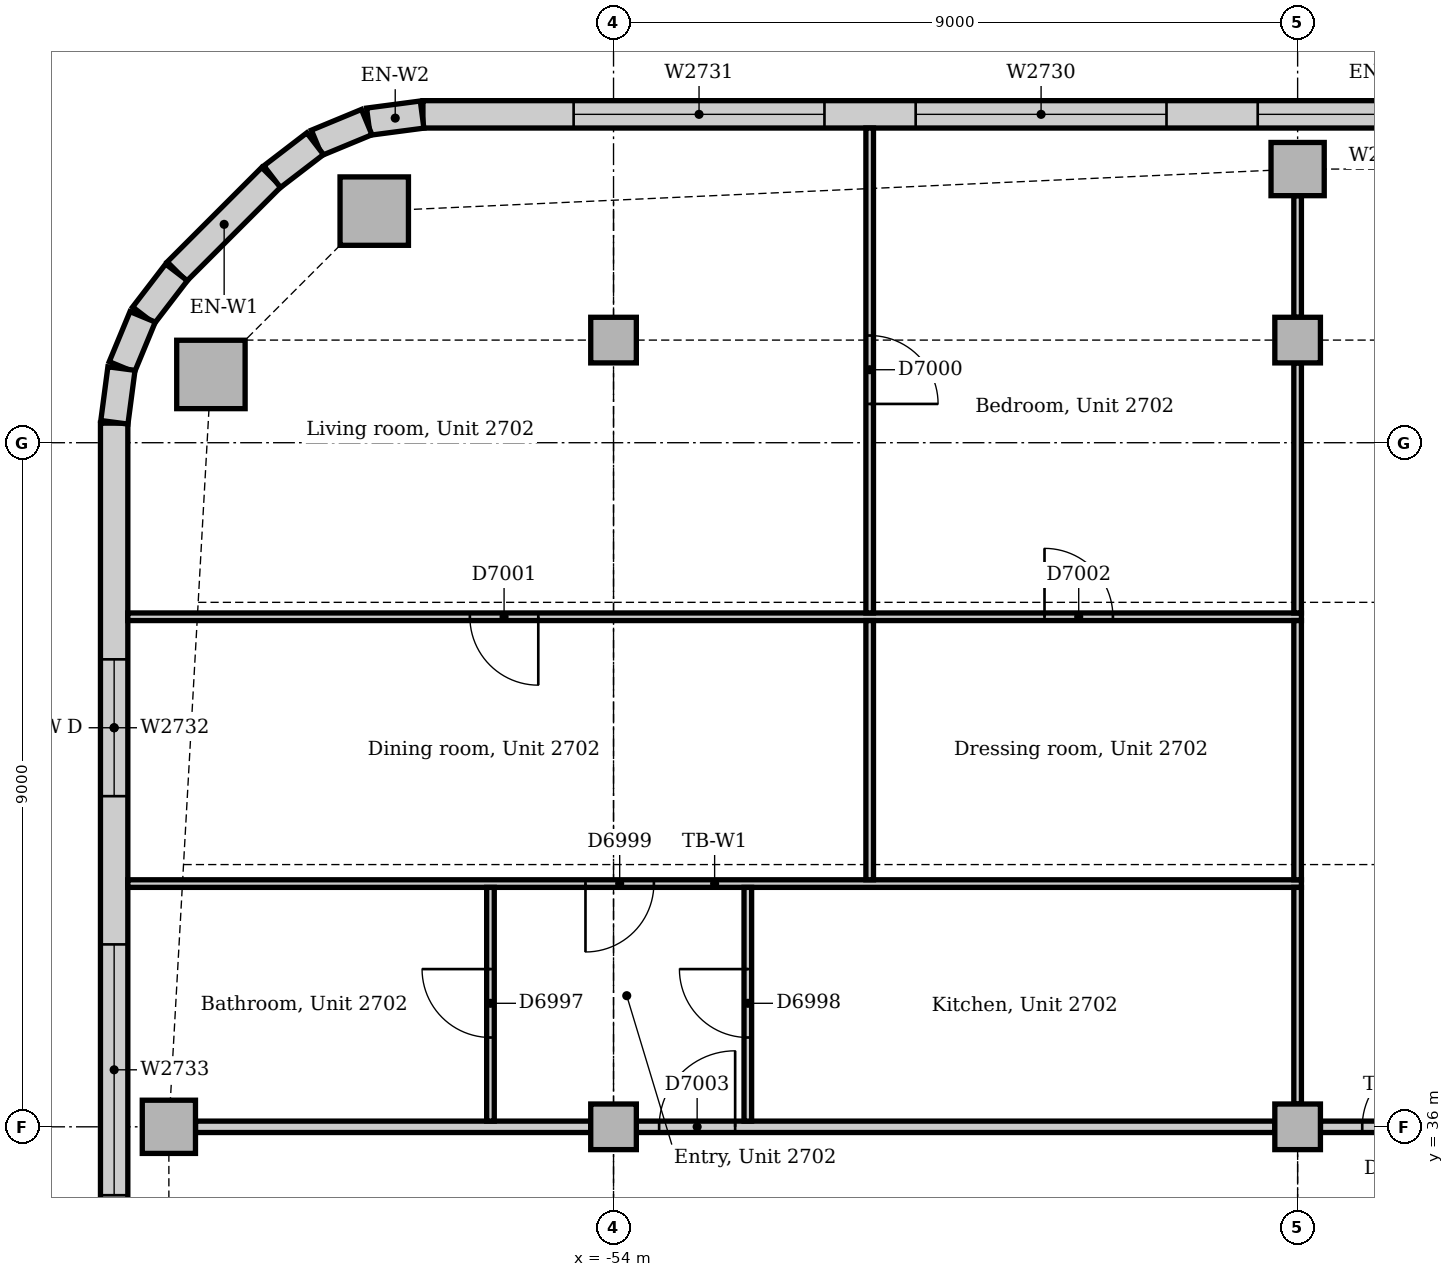
"""IFC4 building model, lengths in metres.
Left out: names, types, materials, properties, quantities, classifications, styles, units other than length and angle.
Written with IfcOpenShell. Run it as: python <this file> out.ifc"""

import sys

from ifc_helpers import new_model, si_unit, direction, frame, frame_2d, origin, origin_2d, place, context, subcontext, project, spatial, rectangle, extrude, element, fill, save


model = new_model("IFC4")
c1 = context("Model", 3, precision=1e-05, world=origin(), true_north=direction((0.0, 1.0)))
c2 = subcontext(c1, "Body", "Model", "MODEL_VIEW")
j1 = project(units=[si_unit("LENGTHUNIT", "METRE"), si_unit("PLANEANGLEUNIT", "RADIAN")], contexts=[c1])
p1 = place(None, origin())
s1 = spatial("IfcSite", under=j1, at=p1, CompositionType="ELEMENT")
p2 = place(p1, origin())
s2 = spatial("IfcBuilding", under=s1, at=p2, CompositionType="ELEMENT")
p3 = place(p2, frame((0.0, 0.0, 116.0)))
s3 = spatial("IfcBuildingStorey", under=s2, at=p3, CompositionType="ELEMENT", Elevation=116.0)
for number, where, z_axis, x_axis in (
    (1, (-57.148, 48.047, 0.0), (0.0, 0.0, 1.0), (1.0, 0.0, 0.0)),
    (2, (-59.297, 45.898, 0.0), (0.0, 0.0, 1.0), (1.0, 0.0, 0.0)),
):
    element("IfcColumn", number, at=place(p3, frame(where, z_axis=z_axis, x_axis=x_axis)), inside=s3, PredefinedType="COLUMN", context=c2, shape_type="SweptSolid", body=[
        extrude(rectangle(XDim=0.9, YDim=0.9, at=origin_2d()), origin(), (0.0, 0.0, 1.0), 3.85),
    ])
for number, where, z_axis, x_axis in (
    (3, (-45.0, 48.6, 0.0), (0.0, 0.0, 1.0), (1.0, 0.0, 0.0)),
    (4, (-59.85, 36.0, 0.0), (0.0, 0.0, 1.0), (1.0, 0.0, 0.0)),
):
    element("IfcColumn", number, at=place(p3, frame(where, z_axis=z_axis, x_axis=x_axis)), inside=s3, PredefinedType="COLUMN", context=c2, shape_type="SweptSolid", body=[
        extrude(rectangle(XDim=0.7, YDim=0.7, at=origin_2d()), origin(), (0.0, 0.0, 1.0), 3.85),
    ])
for number, where, z_axis, x_axis in (
    (5, (-54.0, 36.0, 0.0), (0.0, 0.0, 1.0), (1.0, 0.0, 0.0)),
    (6, (-54.0, 46.35, 0.0), (0.0, 0.0, 1.0), (1.0, 0.0, 0.0)),
    (7, (-45.0, 36.0, 0.0), (0.0, 0.0, 1.0), (1.0, 0.0, 0.0)),
    (8, (-45.0, 46.35, 0.0), (0.0, 0.0, 1.0), (1.0, 0.0, 0.0)),
):
    element("IfcColumn", number, at=place(p3, frame(where, z_axis=z_axis, x_axis=x_axis)), inside=s3, PredefinedType="COLUMN", context=c2, shape_type="SweptSolid", body=[
        extrude(rectangle(XDim=0.6, YDim=0.6, at=origin_2d()), origin(), (0.0, 0.0, 1.0), 3.85),
    ])
p4 = place(p3, frame((-31.243, 49.32, 0.0), z_axis=(0.0, 0.0, 1.0), x_axis=(-1.0, 0.0, 0.0)))
e9 = element("IfcWall", 9, at=p4, inside=s3, PredefinedType="STANDARD", context=c2, shape_type="SweptSolid", body=[
    extrude(rectangle(XDim=25.265, YDim=0.36, at=frame_2d((12.632, 0.0))), origin(), (0.0, 0.0, 1.0), 3.85),
])
p5 = place(p4, frame((1.982, 0.0, 0.9)))
e10 = element("IfcOpeningElement", 10, at=p5, cuts=e9, PredefinedType="OPENING", context=c2, shape_type="SweptSolid", body=[
    extrude(rectangle(XDim=3.3, YDim=1.6, at=frame_2d((1.65, 0.8))), frame((0.0, 0.19, 0.0), z_axis=(0.0, -1.0, 0.0), x_axis=(1.0, 0.0, 0.0)), (0.0, 0.0, 1.0), 0.38),
])
p6 = place(p4, frame((6.482, 0.0, 0.9)))
e11 = element("IfcOpeningElement", 11, at=p6, cuts=e9, PredefinedType="OPENING", context=c2, shape_type="SweptSolid", body=[
    extrude(rectangle(XDim=3.3, YDim=1.6, at=frame_2d((1.65, 0.8))), frame((0.0, 0.19, 0.0), z_axis=(0.0, -1.0, 0.0), x_axis=(1.0, 0.0, 0.0)), (0.0, 0.0, 1.0), 0.38),
])
p7 = place(p4, frame((10.982, 0.0, 0.9)))
e12 = element("IfcOpeningElement", 12, at=p7, cuts=e9, PredefinedType="OPENING", context=c2, shape_type="SweptSolid", body=[
    extrude(rectangle(XDim=3.3, YDim=1.6, at=frame_2d((1.65, 0.8))), frame((0.0, 0.19, 0.0), z_axis=(0.0, -1.0, 0.0), x_axis=(1.0, 0.0, 0.0)), (0.0, 0.0, 1.0), 0.38),
])
p8 = place(p4, frame((15.482, 0.0, 0.9)))
e13 = element("IfcOpeningElement", 13, at=p8, cuts=e9, PredefinedType="OPENING", context=c2, shape_type="SweptSolid", body=[
    extrude(rectangle(XDim=3.3, YDim=1.6, at=frame_2d((1.65, 0.8))), frame((0.0, 0.19, 0.0), z_axis=(0.0, -1.0, 0.0), x_axis=(1.0, 0.0, 0.0)), (0.0, 0.0, 1.0), 0.38),
])
p9 = place(p4, frame((19.982, 0.0, 0.9)))
e14 = element("IfcOpeningElement", 14, at=p9, cuts=e9, PredefinedType="OPENING", context=c2, shape_type="SweptSolid", body=[
    extrude(rectangle(XDim=3.3, YDim=1.6, at=frame_2d((1.65, 0.8))), frame((0.0, 0.19, 0.0), z_axis=(0.0, -1.0, 0.0), x_axis=(1.0, 0.0, 0.0)), (0.0, 0.0, 1.0), 0.38),
])
p10 = place(p3, frame((-58.501, 48.494, 0.0), z_axis=(0.0, 0.0, 1.0), x_axis=(-0.707106781187, -0.707106781187, 0.0)))
e15 = element("IfcWall", 15, at=p10, inside=s3, PredefinedType="STANDARD", context=c2, shape_type="SweptSolid", body=[
    extrude(rectangle(XDim=1.757, YDim=0.36, at=frame_2d((0.879, 0.0))), origin(), (0.0, 0.0, 1.0), 3.85),
])
p11 = place(p3, frame((-60.57, 45.257, 0.0), z_axis=(0.0, 0.0, 1.0), x_axis=(0.0, -1.0, 0.0)))
e16 = element("IfcWall", 16, at=p11, inside=s3, PredefinedType="STANDARD", context=c2, shape_type="SweptSolid", body=[
    extrude(rectangle(XDim=21.515, YDim=0.36, at=frame_2d((10.757, 0.0))), origin(), (0.0, 0.0, 1.0), 3.85),
])
p12 = place(p11, frame((3.107, 0.0, 0.9)))
e17 = element("IfcOpeningElement", 17, at=p12, cuts=e16, PredefinedType="OPENING", context=c2, shape_type="SweptSolid", body=[
    extrude(rectangle(XDim=1.8, YDim=1.6, at=frame_2d((0.9, 0.8))), frame((0.0, 0.19, 0.0), z_axis=(0.0, -1.0, 0.0), x_axis=(1.0, 0.0, 0.0)), (0.0, 0.0, 1.0), 0.38),
])
p13 = place(p11, frame((6.857, 0.0, 0.9)))
e18 = element("IfcOpeningElement", 18, at=p13, cuts=e16, PredefinedType="OPENING", context=c2, shape_type="SweptSolid", body=[
    extrude(rectangle(XDim=3.3, YDim=1.6, at=frame_2d((1.65, 0.8))), frame((0.0, 0.19, 0.0), z_axis=(0.0, -1.0, 0.0), x_axis=(1.0, 0.0, 0.0)), (0.0, 0.0, 1.0), 0.38),
])
p14 = place(p11, frame((11.357, 0.0, 0.9)))
e19 = element("IfcOpeningElement", 19, at=p14, cuts=e16, PredefinedType="OPENING", context=c2, shape_type="SweptSolid", body=[
    extrude(rectangle(XDim=3.3, YDim=1.6, at=frame_2d((1.65, 0.8))), frame((0.0, 0.19, 0.0), z_axis=(0.0, -1.0, 0.0), x_axis=(1.0, 0.0, 0.0)), (0.0, 0.0, 1.0), 0.38),
])
p15 = place(p11, frame((15.857, 0.0, 0.9)))
e20 = element("IfcOpeningElement", 20, at=p15, cuts=e16, PredefinedType="OPENING", context=c2, shape_type="SweptSolid", body=[
    extrude(rectangle(XDim=3.3, YDim=1.6, at=frame_2d((1.65, 0.8))), frame((0.0, 0.19, 0.0), z_axis=(0.0, -1.0, 0.0), x_axis=(1.0, 0.0, 0.0)), (0.0, 0.0, 1.0), 0.38),
])
for number, where, z_axis, x_axis in (
    (21, (-56.519, 49.317, 0.0), (0.0, 0.0, 1.0), (-0.991, -0.131, 0.0)),
    (22, (-57.247, 49.218, 0.0), (0.0, 0.0, 1.0), (-0.924, -0.383, 0.0)),
):
    element("IfcWall", number, at=place(p3, frame(where, z_axis=z_axis, x_axis=x_axis)), inside=s3, PredefinedType="STANDARD", context=c2, shape_type="SweptSolid", body=[
        extrude(rectangle(XDim=0.713, YDim=0.36, at=frame_2d((0.356, 0.0))), origin(), (0.0, 0.0, 1.0), 3.85),
    ])
for number, where, z_axis, x_axis in (
    (23, (-57.925, 48.934, 0.0), (0.0, 0.0, 1.0), (-0.793, -0.609, 0.0)),
    (24, (-59.75, 47.241, 0.0), (0.0, 0.0, 1.0), (-0.609, -0.793, 0.0)),
):
    element("IfcWall", number, at=place(p3, frame(where, z_axis=z_axis, x_axis=x_axis)), inside=s3, PredefinedType="STANDARD", context=c2, shape_type="SweptSolid", body=[
        extrude(rectangle(XDim=0.713, YDim=0.36, at=frame_2d((0.357, 0.0))), origin(), (0.0, 0.0, 1.0), 3.85),
    ])
for number, where, z_axis, x_axis in (
    (25, (-60.195, 46.656, 0.0), (0.0, 0.0, 1.0), (-0.383, -0.924, 0.0)),
    (26, (-60.474, 45.976, 0.0), (0.0, 0.0, 1.0), (-0.131, -0.991, 0.0)),
):
    element("IfcWall", number, at=place(p3, frame(where, z_axis=z_axis, x_axis=x_axis)), inside=s3, PredefinedType="STANDARD", context=c2, shape_type="SweptSolid", body=[
        extrude(rectangle(XDim=0.713, YDim=0.36, at=frame_2d((0.356, 0.0))), origin(), (0.0, 0.0, 1.0), 3.85),
    ])
p16 = place(p3, frame((-44.7, 36.0, 0.0), z_axis=(0.0, 0.0, 1.0), x_axis=(1.0, 0.0, 0.0)))
e27 = element("IfcWall", 27, at=p16, inside=s3, PredefinedType="PARTITIONING", context=c2, shape_type="SweptSolid", body=[
    extrude(rectangle(XDim=1.975, YDim=0.15, at=frame_2d((0.988, 0.0))), origin(), (0.0, 0.0, 1.0), 3.602),
])
p17 = place(p16, frame((0.55, 0.0, 0.0)))
e28 = element("IfcOpeningElement", 28, at=p17, cuts=e27, PredefinedType="OPENING", context=c2, shape_type="SweptSolid", body=[
    extrude(rectangle(XDim=0.9, YDim=2.1, at=frame_2d((0.45, 1.05))), frame((0.0, 0.085, 0.0), z_axis=(0.0, -1.0, 0.0), x_axis=(1.0, 0.0, 0.0)), (0.0, 0.0, 1.0), 0.17),
])
p18 = place(p3, frame((-53.7, 36.0, 0.0), z_axis=(0.0, 0.0, 1.0), x_axis=(1.0, 0.0, 0.0)))
e29 = element("IfcWall", 29, at=p18, inside=s3, PredefinedType="PARTITIONING", context=c2, shape_type="SweptSolid", body=[
    extrude(rectangle(XDim=8.4, YDim=0.15, at=frame_2d((4.2, 0.0))), origin(), (0.0, 0.0, 1.0), 3.262),
])
p19 = place(p18, frame((0.3, 0.0, 0.0)))
e30 = element("IfcOpeningElement", 30, at=p19, cuts=e29, PredefinedType="OPENING", context=c2, shape_type="SweptSolid", body=[
    extrude(rectangle(XDim=1.0, YDim=2.1, at=frame_2d((0.5, 1.05))), frame((0.0, 0.085, 0.0), z_axis=(0.0, -1.0, 0.0), x_axis=(1.0, 0.0, 0.0)), (0.0, 0.0, 1.0), 0.17),
])
p20 = place(p3, frame((-59.5, 36.0, 0.0), z_axis=(0.0, 0.0, 1.0), x_axis=(1.0, 0.0, 0.0)))
e31 = element("IfcWall", 31, at=p20, inside=s3, PredefinedType="PARTITIONING", context=c2, shape_type="SweptSolid", body=[
    extrude(rectangle(XDim=5.2, YDim=0.15, at=frame_2d((2.6, 0.0))), origin(), (0.0, 0.0, 1.0), 3.35),
])
p21 = place(p3, frame((-60.39, 39.2, 0.0), z_axis=(0.0, 0.0, 1.0), x_axis=(1.0, 0.0, 0.0)))
e32 = element("IfcWall", 32, at=p21, inside=s3, PredefinedType="PARTITIONING", context=c2, shape_type="SweptSolid", body=[
    extrude(rectangle(XDim=15.44, YDim=0.1, at=frame_2d((7.72, 0.0))), origin(), (0.0, 0.0, 1.0), 3.85),
])
p22 = place(p21, frame((6.021, 0.0, 0.0)))
e33 = element("IfcOpeningElement", 33, at=p22, cuts=e32, PredefinedType="OPENING", context=c2, shape_type="SweptSolid", body=[
    extrude(rectangle(XDim=0.9, YDim=2.1, at=frame_2d((0.45, 1.05))), frame((0.0, 0.06, 0.0), z_axis=(0.0, -1.0, 0.0), x_axis=(1.0, 0.0, 0.0)), (0.0, 0.0, 1.0), 0.12),
])
p23 = place(p3, frame((-60.39, 42.71, 0.0), z_axis=(0.0, 0.0, 1.0), x_axis=(1.0, 0.0, 0.0)))
e34 = element("IfcWall", 34, at=p23, inside=s3, PredefinedType="PARTITIONING", context=c2, shape_type="SweptSolid", body=[
    extrude(rectangle(XDim=15.44, YDim=0.1, at=frame_2d((7.72, 0.0))), origin(), (0.0, 0.0, 1.0), 3.85),
])
p24 = place(p23, frame((4.5, 0.0, 0.0)))
e35 = element("IfcOpeningElement", 35, at=p24, cuts=e34, PredefinedType="OPENING", context=c2, shape_type="SweptSolid", body=[
    extrude(rectangle(XDim=0.9, YDim=2.1, at=frame_2d((0.45, 1.05))), frame((0.0, 0.06, 0.0), z_axis=(0.0, -1.0, 0.0), x_axis=(1.0, 0.0, 0.0)), (0.0, 0.0, 1.0), 0.12),
])
p25 = place(p23, frame((12.06, 0.0, 0.0)))
e36 = element("IfcOpeningElement", 36, at=p25, cuts=e34, PredefinedType="OPENING", context=c2, shape_type="SweptSolid", body=[
    extrude(rectangle(XDim=0.9, YDim=2.1, at=frame_2d((0.45, 1.05))), frame((0.0, 0.06, 0.0), z_axis=(0.0, -1.0, 0.0), x_axis=(1.0, 0.0, 0.0)), (0.0, 0.0, 1.0), 0.12),
])
p26 = place(p3, frame((-45.0, 42.76, 0.0), z_axis=(0.0, 0.0, 1.0), x_axis=(0.0, 1.0, 0.0)))
e37 = element("IfcWall", 37, at=p26, inside=s3, PredefinedType="PARTITIONING", context=c2, shape_type="SweptSolid", body=[
    extrude(rectangle(XDim=3.29, YDim=0.1, at=frame_2d((1.645, 0.0))), origin(), (0.0, 0.0, 1.0), 3.362),
])
p27 = place(p3, frame((-45.0, 39.25, 0.0), z_axis=(0.0, 0.0, 1.0), x_axis=(0.0, 1.0, 0.0)))
e38 = element("IfcWall", 38, at=p27, inside=s3, PredefinedType="PARTITIONING", context=c2, shape_type="SweptSolid", body=[
    extrude(rectangle(XDim=3.41, YDim=0.1, at=frame_2d((1.705, 0.0))), origin(), (0.0, 0.0, 1.0), 3.362),
])
p28 = place(p3, frame((-45.0, 36.3, 0.0), z_axis=(0.0, 0.0, 1.0), x_axis=(0.0, 1.0, 0.0)))
e39 = element("IfcWall", 39, at=p28, inside=s3, PredefinedType="PARTITIONING", context=c2, shape_type="SweptSolid", body=[
    extrude(rectangle(XDim=2.85, YDim=0.1, at=frame_2d((1.425, 0.0))), origin(), (0.0, 0.0, 1.0), 3.362),
])
p29 = place(p3, frame((-45.0, 46.65, 0.0), z_axis=(0.0, 0.0, 1.0), x_axis=(0.0, 1.0, 0.0)))
e40 = element("IfcWall", 40, at=p29, inside=s3, PredefinedType="PARTITIONING", context=c2, shape_type="SweptSolid", body=[
    extrude(rectangle(XDim=1.6, YDim=0.1, at=frame_2d((0.8, 0.0))), origin(), (0.0, 0.0, 1.0), 3.652),
])
p30 = place(p3, frame((-50.63, 39.25, 0.0), z_axis=(0.0, 0.0, 1.0), x_axis=(0.0, 1.0, 0.0)))
e41 = element("IfcWall", 41, at=p30, inside=s3, PredefinedType="PARTITIONING", context=c2, shape_type="SweptSolid", body=[
    extrude(rectangle(XDim=3.41, YDim=0.1, at=frame_2d((1.705, 0.0))), origin(), (0.0, 0.0, 1.0), 3.85),
])
p31 = place(p3, frame((-50.63, 42.76, 0.0), z_axis=(0.0, 0.0, 1.0), x_axis=(0.0, 1.0, 0.0)))
e42 = element("IfcWall", 42, at=p31, inside=s3, PredefinedType="PARTITIONING", context=c2, shape_type="SweptSolid", body=[
    extrude(rectangle(XDim=6.38, YDim=0.1, at=frame_2d((3.19, 0.0))), origin(), (0.0, 0.0, 1.0), 3.85),
])
p32 = place(p31, frame((2.75, 0.0, 0.0)))
e43 = element("IfcOpeningElement", 43, at=p32, cuts=e42, PredefinedType="OPENING", context=c2, shape_type="SweptSolid", body=[
    extrude(rectangle(XDim=0.9, YDim=2.1, at=frame_2d((0.45, 1.05))), frame((0.0, 0.06, 0.0), z_axis=(0.0, -1.0, 0.0), x_axis=(1.0, 0.0, 0.0)), (0.0, 0.0, 1.0), 0.12),
])
p33 = place(p3, frame((-55.619, 36.075, 0.0), z_axis=(0.0, 0.0, 1.0), x_axis=(0.0, 1.0, 0.0)))
e44 = element("IfcWall", 44, at=p33, inside=s3, PredefinedType="PARTITIONING", context=c2, shape_type="SweptSolid", body=[
    extrude(rectangle(XDim=3.075, YDim=0.1, at=frame_2d((1.538, 0.0))), origin(), (0.0, 0.0, 1.0), 3.85),
])
p34 = place(p33, frame((1.1, 0.0, 0.0)))
e45 = element("IfcOpeningElement", 45, at=p34, cuts=e44, PredefinedType="OPENING", context=c2, shape_type="SweptSolid", body=[
    extrude(rectangle(XDim=0.9, YDim=2.1, at=frame_2d((0.45, 1.05))), frame((0.0, 0.06, 0.0), z_axis=(0.0, -1.0, 0.0), x_axis=(1.0, 0.0, 0.0)), (0.0, 0.0, 1.0), 0.12),
])
p35 = place(p3, frame((-52.233, 36.075, 0.0), z_axis=(0.0, 0.0, 1.0), x_axis=(0.0, 1.0, 0.0)))
e46 = element("IfcWall", 46, at=p35, inside=s3, PredefinedType="PARTITIONING", context=c2, shape_type="SweptSolid", body=[
    extrude(rectangle(XDim=3.075, YDim=0.1, at=frame_2d((1.538, 0.0))), origin(), (0.0, 0.0, 1.0), 3.85),
])
p36 = place(p35, frame((1.1, 0.0, 0.0)))
e47 = element("IfcOpeningElement", 47, at=p36, cuts=e46, PredefinedType="OPENING", context=c2, shape_type="SweptSolid", body=[
    extrude(rectangle(XDim=0.9, YDim=2.1, at=frame_2d((0.45, 1.05))), frame((0.0, 0.06, 0.0), z_axis=(0.0, -1.0, 0.0), x_axis=(1.0, 0.0, 0.0)), (0.0, 0.0, 1.0), 0.12),
])
p37 = place(p7, origin())
e48 = element("IfcWindow", 48, at=p37, inside=s3, PartitioningType="SINGLE_PANEL", PredefinedType="WINDOW", context=c2, shape_type="SweptSolid", body=[
    extrude(rectangle(XDim=3.3, YDim=1.6, at=frame_2d((1.65, 0.8))), frame((0.0, 0.13, 0.0), z_axis=(0.0, -1.0, 0.0), x_axis=(1.0, 0.0, 0.0)), (0.0, 0.0, 1.0), 0.06),
])
fill(e12, e48)
p38 = place(p8, origin())
e49 = element("IfcWindow", 49, at=p38, inside=s3, PartitioningType="SINGLE_PANEL", PredefinedType="WINDOW", context=c2, shape_type="SweptSolid", body=[
    extrude(rectangle(XDim=3.3, YDim=1.6, at=frame_2d((1.65, 0.8))), frame((0.0, 0.13, 0.0), z_axis=(0.0, -1.0, 0.0), x_axis=(1.0, 0.0, 0.0)), (0.0, 0.0, 1.0), 0.06),
])
fill(e13, e49)
p39 = place(p9, origin())
e50 = element("IfcWindow", 50, at=p39, inside=s3, PartitioningType="SINGLE_PANEL", PredefinedType="WINDOW", context=c2, shape_type="SweptSolid", body=[
    extrude(rectangle(XDim=3.3, YDim=1.6, at=frame_2d((1.65, 0.8))), frame((0.0, 0.13, 0.0), z_axis=(0.0, -1.0, 0.0), x_axis=(1.0, 0.0, 0.0)), (0.0, 0.0, 1.0), 0.06),
])
fill(e14, e50)
p40 = place(p12, origin())
e51 = element("IfcWindow", 51, at=p40, inside=s3, PartitioningType="SINGLE_PANEL", PredefinedType="WINDOW", context=c2, shape_type="SweptSolid", body=[
    extrude(rectangle(XDim=1.8, YDim=1.6, at=frame_2d((0.9, 0.8))), frame((0.0, 0.13, 0.0), z_axis=(0.0, -1.0, 0.0), x_axis=(1.0, 0.0, 0.0)), (0.0, 0.0, 1.0), 0.06),
])
fill(e17, e51)
p41 = place(p13, origin())
e52 = element("IfcWindow", 52, at=p41, inside=s3, PartitioningType="SINGLE_PANEL", PredefinedType="WINDOW", context=c2, shape_type="SweptSolid", body=[
    extrude(rectangle(XDim=3.3, YDim=1.6, at=frame_2d((1.65, 0.8))), frame((0.0, 0.13, 0.0), z_axis=(0.0, -1.0, 0.0), x_axis=(1.0, 0.0, 0.0)), (0.0, 0.0, 1.0), 0.06),
])
fill(e18, e52)
p42 = place(p17, origin())
e53 = element("IfcDoor", 53, at=p42, inside=s3, OperationType="SINGLE_SWING_RIGHT", PredefinedType="DOOR", context=c2, shape_type="SweptSolid", body=[
    extrude(rectangle(XDim=0.9, YDim=2.1, at=frame_2d((0.45, 1.05))), frame((0.0, 0.025, 0.0), z_axis=(0.0, -1.0, 0.0), x_axis=(1.0, 0.0, 0.0)), (0.0, 0.0, 1.0), 0.05),
])
fill(e28, e53)
p43 = place(p34, origin())
e54 = element("IfcDoor", 54, at=p43, inside=s3, OperationType="SINGLE_SWING_RIGHT", PredefinedType="DOOR", context=c2, shape_type="SweptSolid", body=[
    extrude(rectangle(XDim=0.9, YDim=2.1, at=frame_2d((0.45, 1.05))), frame((0.0, 0.025, 0.0), z_axis=(0.0, -1.0, 0.0), x_axis=(1.0, 0.0, 0.0)), (0.0, 0.0, 1.0), 0.05),
])
fill(e45, e54)
p44 = place(p36, origin())
e55 = element("IfcDoor", 55, at=p44, inside=s3, OperationType="SINGLE_SWING_RIGHT", PredefinedType="DOOR", context=c2, shape_type="SweptSolid", body=[
    extrude(rectangle(XDim=0.9, YDim=2.1, at=frame_2d((0.45, 1.05))), frame((0.0, 0.025, 0.0), z_axis=(0.0, -1.0, 0.0), x_axis=(1.0, 0.0, 0.0)), (0.0, 0.0, 1.0), 0.05),
])
fill(e47, e55)
p45 = place(p22, frame((0.9, 0.0, 0.0), z_axis=(0.0, 0.0, 1.0), x_axis=(-1.0, 0.0, 0.0)))
e56 = element("IfcDoor", 56, at=p45, inside=s3, OperationType="SINGLE_SWING_RIGHT", PredefinedType="DOOR", context=c2, shape_type="SweptSolid", body=[
    extrude(rectangle(XDim=0.9, YDim=2.1, at=frame_2d((0.45, 1.05))), frame((0.0, 0.025, 0.0), z_axis=(0.0, -1.0, 0.0), x_axis=(1.0, 0.0, 0.0)), (0.0, 0.0, 1.0), 0.05),
])
fill(e33, e56)
p46 = place(p32, frame((0.9, 0.0, 0.0), z_axis=(0.0, 0.0, 1.0), x_axis=(-1.0, 0.0, 0.0)))
e57 = element("IfcDoor", 57, at=p46, inside=s3, OperationType="SINGLE_SWING_RIGHT", PredefinedType="DOOR", context=c2, shape_type="SweptSolid", body=[
    extrude(rectangle(XDim=0.9, YDim=2.1, at=frame_2d((0.45, 1.05))), frame((0.0, 0.025, 0.0), z_axis=(0.0, -1.0, 0.0), x_axis=(1.0, 0.0, 0.0)), (0.0, 0.0, 1.0), 0.05),
])
fill(e43, e57)
p47 = place(p24, frame((0.9, 0.0, 0.0), z_axis=(0.0, 0.0, 1.0), x_axis=(-1.0, 0.0, 0.0)))
e58 = element("IfcDoor", 58, at=p47, inside=s3, OperationType="SINGLE_SWING_LEFT", PredefinedType="DOOR", context=c2, shape_type="SweptSolid", body=[
    extrude(rectangle(XDim=0.9, YDim=2.1, at=frame_2d((0.45, 1.05))), frame((0.0, 0.025, 0.0), z_axis=(0.0, -1.0, 0.0), x_axis=(1.0, 0.0, 0.0)), (0.0, 0.0, 1.0), 0.05),
])
fill(e35, e58)
p48 = place(p25, origin())
e59 = element("IfcDoor", 59, at=p48, inside=s3, OperationType="SINGLE_SWING_LEFT", PredefinedType="DOOR", context=c2, shape_type="SweptSolid", body=[
    extrude(rectangle(XDim=0.9, YDim=2.1, at=frame_2d((0.45, 1.05))), frame((0.0, 0.025, 0.0), z_axis=(0.0, -1.0, 0.0), x_axis=(1.0, 0.0, 0.0)), (0.0, 0.0, 1.0), 0.05),
])
fill(e36, e59)
p49 = place(p19, origin())
e60 = element("IfcDoor", 60, at=p49, inside=s3, OperationType="SINGLE_SWING_RIGHT", PredefinedType="DOOR", context=c2, shape_type="SweptSolid", body=[
    extrude(rectangle(XDim=1.0, YDim=2.1, at=frame_2d((0.5, 1.05))), frame((0.0, 0.025, 0.0), z_axis=(0.0, -1.0, 0.0), x_axis=(1.0, 0.0, 0.0)), (0.0, 0.0, 1.0), 0.05),
])
fill(e30, e60)
save(model, sys.argv[1])
